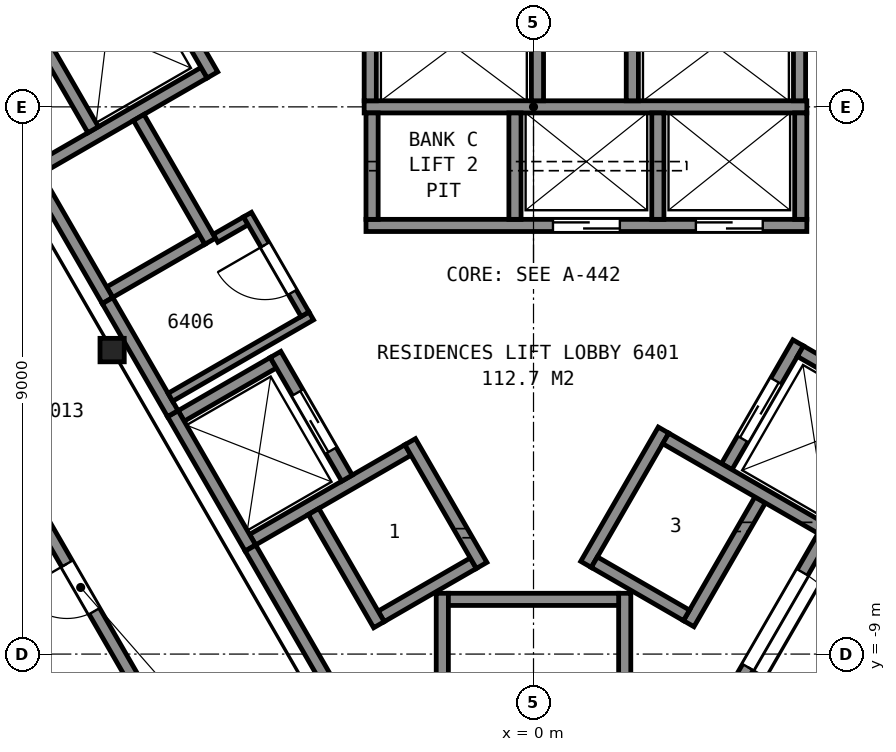
"""IFC4 building model, lengths in metres.
Left out: names, types, materials, properties, quantities, classifications, styles, units other than length and angle.
Written with IfcOpenShell. Run it as: python <this file> out.ifc"""

import sys

from ifc_helpers import new_model, si_unit, direction, frame, frame_2d, origin, origin_2d, place, context, subcontext, project, spatial, rectangle, i_section, extrude, element, fill, save


model = new_model("IFC4")
c1 = context("Model", 3, precision=1e-05, world=origin(), true_north=direction((0.0, 1.0)))
c2 = subcontext(c1, "Body", "Model", "MODEL_VIEW")
j1 = project(units=[si_unit("LENGTHUNIT", "METRE"), si_unit("PLANEANGLEUNIT", "RADIAN")], contexts=[c1])
p1 = place(None, origin())
s1 = spatial("IfcSite", under=j1, at=p1, CompositionType="ELEMENT")
p2 = place(p1, origin())
s2 = spatial("IfcBuilding", under=s1, at=p2, CompositionType="ELEMENT")
p3 = place(p2, frame((0.0, 0.0, 254.5)))
s3 = spatial("IfcBuildingStorey", under=s2, at=p3, CompositionType="ELEMENT", Elevation=254.5)
p4 = place(p3, frame((-6.93, -4.0, 0.0), z_axis=(0.0, 0.0, 1.0), x_axis=(1.0, 0.0, 0.0)))
e1 = element("IfcColumn", 1, at=p4, inside=s3, PredefinedType="COLUMN", context=c2, shape_type="SweptSolid", body=[
    extrude(i_section(OverallWidth=0.399, OverallDepth=0.386, WebThickness=0.021, FlangeThickness=0.033, FilletRadius=0.015, at=origin_2d()), origin(), (0.0, 0.0, 1.0), 3.66),
])
for number, where, z_axis, x_axis in (
    (2, (1.5, -8.0, 0.0), (0.0, 0.0, 1.0), (0.0, -1.0, 0.0)),
    (3, (-1.5, -8.0, 0.0), (0.0, 0.0, 1.0), (0.0, -1.0, 0.0)),
):
    element("IfcWall", number, at=place(p3, frame(where, z_axis=z_axis, x_axis=x_axis)), inside=s3, PredefinedType="PARTITIONING", context=c2, shape_type="SweptSolid", body=[
        extrude(rectangle(XDim=9.6, YDim=0.2, at=frame_2d((4.8, 0.0))), origin(), (0.0, 0.0, 1.0), 3.45),
    ])
p5 = place(p3, frame((-1.4, -8.1, 0.0), z_axis=(0.0, 0.0, 1.0), x_axis=(1.0, 0.0, 0.0)))
e4 = element("IfcWall", 4, at=p5, inside=s3, PredefinedType="PARTITIONING", context=c2, shape_type="SweptSolid", body=[
    extrude(rectangle(XDim=2.8, YDim=0.2, at=frame_2d((1.4, 0.0))), origin(), (0.0, 0.0, 1.0), 3.45),
])
p6 = place(p3, frame((-2.755, -1.95, 0.0), z_axis=(0.0, 0.0, 1.0), x_axis=(1.0, 0.0, 0.0)))
e5 = element("IfcWall", 5, at=p6, inside=s3, PredefinedType="PARTITIONING", context=c2, shape_type="SweptSolid", body=[
    extrude(rectangle(XDim=7.25, YDim=0.2, at=frame_2d((3.625, 0.0))), origin(), (0.0, 0.0, 1.0), 3.7),
])
p7 = place(p6, frame((3.075, 0.0, 0.0)))
e6 = element("IfcOpeningElement", 6, at=p7, cuts=e5, PredefinedType="OPENING", context=c2, shape_type="SweptSolid", body=[
    extrude(rectangle(XDim=1.1, YDim=2.1, at=frame_2d((0.55, 1.05))), frame((0.0, 0.11, 0.0), z_axis=(0.0, -1.0, 0.0), x_axis=(1.0, 0.0, 0.0)), (0.0, 0.0, 1.0), 0.22),
])
p8 = place(p6, frame((5.425, 0.0, 0.0)))
e7 = element("IfcOpeningElement", 7, at=p8, cuts=e5, PredefinedType="OPENING", context=c2, shape_type="SweptSolid", body=[
    extrude(rectangle(XDim=1.1, YDim=2.1, at=frame_2d((0.55, 1.05))), frame((0.0, 0.11, 0.0), z_axis=(0.0, -1.0, 0.0), x_axis=(1.0, 0.0, 0.0)), (0.0, 0.0, 1.0), 0.22),
])
p9 = place(p3, frame((-2.785, 0.0, 0.0), z_axis=(0.0, 0.0, 1.0), x_axis=(1.0, 0.0, 0.0)))
e8 = element("IfcWall", 8, at=p9, inside=s3, PredefinedType="PARTITIONING", context=c2, shape_type="SweptSolid", body=[
    extrude(rectangle(XDim=7.28, YDim=0.2, at=frame_2d((3.64, 0.0))), origin(), (0.0, 0.0, 1.0), 3.7),
])
p10 = place(p3, frame((-2.505, -8.38, 0.0), z_axis=(0.0, 0.0, 1.0), x_axis=(0.866002029911, 0.500040482552, 0.0)))
e9 = element("IfcWall", 9, at=p10, inside=s3, PredefinedType="PARTITIONING", context=c2, shape_type="SweptSolid", body=[
    extrude(rectangle(XDim=1.75, YDim=0.2, at=frame_2d((0.875, 0.0))), origin(), (0.0, 0.0, 1.0), 3.7),
])
p11 = place(p3, frame((-4.62, -7.118, 0.0), z_axis=(0.0, 0.0, 1.0), x_axis=(0.866039495442, 0.49997559174, 0.0)))
e10 = element("IfcWall", 10, at=p11, inside=s3, PredefinedType="PARTITIONING", context=c2, shape_type="SweptSolid", body=[
    extrude(rectangle(XDim=2.95, YDim=0.2, at=frame_2d((1.475, 0.0))), origin(), (0.0, 0.0, 1.0), 3.7),
])
for number, where, z_axis, x_axis in (
    (11, (-5.795, -5.083, 0.0), (0.0, 0.0, 1.0), (0.866, 0.5, 0.0)),
    (12, (-6.97, -3.048, 0.0), (0.0, 0.0, 1.0), (0.866, 0.5, 0.0)),
):
    element("IfcWall", number, at=place(p3, frame(where, z_axis=z_axis, x_axis=x_axis)), inside=s3, PredefinedType="PARTITIONING", context=c2, shape_type="SweptSolid", body=[
        extrude(rectangle(XDim=1.75, YDim=0.2, at=frame_2d((0.875, 0.0))), origin(), (0.0, 0.0, 1.0), 3.7),
    ])
p12 = place(p3, frame((-8.145, -1.013, 0.0), z_axis=(0.0, 0.0, 1.0), x_axis=(0.866016494683, 0.500015430699, 0.0)))
e13 = element("IfcWall", 13, at=p12, inside=s3, PredefinedType="PARTITIONING", context=c2, shape_type="SweptSolid", body=[
    extrude(rectangle(XDim=3.15, YDim=0.2, at=frame_2d((1.575, 0.0))), origin(), (0.0, 0.0, 1.0), 3.7),
])
p13 = place(p3, frame((2.552, -8.5, 0.0), z_axis=(0.0, 0.0, 1.0), x_axis=(0.500016218704, 0.866016039709, 0.0)))
e14 = element("IfcWall", 14, at=p13, inside=s3, PredefinedType="PARTITIONING", context=c2, shape_type="SweptSolid", body=[
    extrude(rectangle(XDim=2.35, YDim=0.2, at=frame_2d((1.175, 0.0))), origin(), (0.0, 0.0, 1.0), 3.7),
])
p14 = place(p3, frame((3.177, -5.917, 0.0), z_axis=(0.0, 0.0, 1.0), x_axis=(0.500016218704, 0.866016039709, 0.0)))
e15 = element("IfcWall", 15, at=p14, inside=s3, PredefinedType="PARTITIONING", context=c2, shape_type="SweptSolid", body=[
    extrude(rectangle(XDim=2.35, YDim=0.2, at=frame_2d((1.175, 0.0))), origin(), (0.0, 0.0, 1.0), 3.7),
])
p15 = place(p14, frame((0.525, 0.0, 0.0)))
e16 = element("IfcOpeningElement", 16, at=p15, cuts=e15, PredefinedType="OPENING", context=c2, shape_type="SweptSolid", body=[
    extrude(rectangle(XDim=1.1, YDim=2.1, at=frame_2d((0.55, 1.05))), frame((0.0, 0.11, 0.0), z_axis=(0.0, -1.0, 0.0), x_axis=(1.0, 0.0, 0.0)), (0.0, 0.0, 1.0), 0.22),
])
p16 = place(p3, frame((0.863, -7.525, 0.0), z_axis=(0.0, 0.0, 1.0), x_axis=(0.499990435942, 0.866030925526, 0.0)))
e17 = element("IfcWall", 17, at=p16, inside=s3, PredefinedType="PARTITIONING", context=c2, shape_type="SweptSolid", body=[
    extrude(rectangle(XDim=2.55, YDim=0.2, at=frame_2d((1.275, 0.0))), origin(), (0.0, 0.0, 1.0), 3.7),
])
p17 = place(p3, frame((4.395, -1.85, 0.0), z_axis=(0.0, 0.0, 1.0), x_axis=(0.0, 1.0, 0.0)))
e18 = element("IfcWall", 18, at=p17, inside=s3, PredefinedType="PARTITIONING", context=c2, shape_type="SweptSolid", body=[
    extrude(rectangle(XDim=1.75, YDim=0.2, at=frame_2d((0.875, 0.0))), origin(), (0.0, 0.0, 1.0), 3.7),
])
p18 = place(p3, frame((4.375, 0.1, 0.0), z_axis=(0.0, 0.0, 1.0), x_axis=(0.0, 1.0, 0.0)))
e19 = element("IfcWall", 19, at=p18, inside=s3, PredefinedType="PARTITIONING", context=c2, shape_type="SweptSolid", body=[
    extrude(rectangle(XDim=1.95, YDim=0.2, at=frame_2d((0.975, 0.0))), origin(), (0.0, 0.0, 1.0), 3.7),
])
p19 = place(p3, frame((2.045, -1.85, 0.0), z_axis=(0.0, 0.0, 1.0), x_axis=(0.0, 1.0, 0.0)))
e20 = element("IfcWall", 20, at=p19, inside=s3, PredefinedType="PARTITIONING", context=c2, shape_type="SweptSolid", body=[
    extrude(rectangle(XDim=1.75, YDim=0.2, at=frame_2d((0.875, 0.0))), origin(), (0.0, 0.0, 1.0), 3.7),
])
for number, where, z_axis, x_axis in (
    (21, (1.625, 0.1, 0.0), (0.0, 0.0, 1.0), (0.0, 1.0, 0.0)),
    (22, (0.065, 0.1, 0.0), (0.0, 0.0, 1.0), (0.0, 1.0, 0.0)),
):
    element("IfcWall", number, at=place(p3, frame(where, z_axis=z_axis, x_axis=x_axis)), inside=s3, PredefinedType="PARTITIONING", context=c2, shape_type="SweptSolid", body=[
        extrude(rectangle(XDim=1.95, YDim=0.2, at=frame_2d((0.975, 0.0))), origin(), (0.0, 0.0, 1.0), 3.7),
    ])
for number, where, z_axis, x_axis in (
    (23, (-0.305, -1.85, 0.0), (0.0, 0.0, 1.0), (0.0, 1.0, 0.0)),
    (24, (-2.655, -1.85, 0.0), (0.0, 0.0, 1.0), (0.0, 1.0, 0.0)),
):
    element("IfcWall", number, at=place(p3, frame(where, z_axis=z_axis, x_axis=x_axis)), inside=s3, PredefinedType="PARTITIONING", context=c2, shape_type="SweptSolid", body=[
        extrude(rectangle(XDim=1.75, YDim=0.2, at=frame_2d((0.875, 0.0))), origin(), (0.0, 0.0, 1.0), 3.7),
    ])
p20 = place(p3, frame((-2.685, 0.1, 0.0), z_axis=(0.0, 0.0, 1.0), x_axis=(0.0, 1.0, 0.0)))
e25 = element("IfcWall", 25, at=p20, inside=s3, PredefinedType="PARTITIONING", context=c2, shape_type="SweptSolid", body=[
    extrude(rectangle(XDim=1.95, YDim=0.2, at=frame_2d((0.975, 0.0))), origin(), (0.0, 0.0, 1.0), 3.7),
])
p21 = place(p3, frame((-5.28, 0.525, 0.0), z_axis=(0.0, 0.0, 1.0), x_axis=(-0.500037662692, 0.866003658127, 0.0)))
e26 = element("IfcWall", 26, at=p21, inside=s3, PredefinedType="PARTITIONING", context=c2, shape_type="SweptSolid", body=[
    extrude(rectangle(XDim=2.95, YDim=0.2, at=frame_2d((1.475, 0.0))), origin(), (0.0, 0.0, 1.0), 3.7),
])
p22 = place(p21, frame((0.925, 0.0, 0.0)))
e27 = element("IfcOpeningElement", 27, at=p22, cuts=e26, PredefinedType="OPENING", context=c2, shape_type="SweptSolid", body=[
    extrude(rectangle(XDim=1.1, YDim=2.1, at=frame_2d((0.55, 1.05))), frame((0.0, 0.11, 0.0), z_axis=(0.0, -1.0, 0.0), x_axis=(1.0, 0.0, 0.0)), (0.0, 0.0, 1.0), 0.22),
])
p23 = place(p3, frame((-0.853, -7.542, 0.0), z_axis=(0.0, 0.0, 1.0), x_axis=(-0.500016218704, 0.866016039709, 0.0)))
e28 = element("IfcWall", 28, at=p23, inside=s3, PredefinedType="PARTITIONING", context=c2, shape_type="SweptSolid", body=[
    extrude(rectangle(XDim=2.35, YDim=0.2, at=frame_2d((1.175, 0.0))), origin(), (0.0, 0.0, 1.0), 3.7),
])
p24 = place(p3, frame((-3.068, -6.107, 0.0), z_axis=(0.0, 0.0, 1.0), x_axis=(-0.499938297808, 0.866061024631, 0.0)))
e29 = element("IfcWall", 29, at=p24, inside=s3, PredefinedType="PARTITIONING", context=c2, shape_type="SweptSolid", body=[
    extrude(rectangle(XDim=2.35, YDim=0.2, at=frame_2d((1.175, 0.0))), origin(), (0.0, 0.0, 1.0), 3.7),
])
p25 = place(p24, frame((0.525, 0.0, 0.0)))
e30 = element("IfcOpeningElement", 30, at=p25, cuts=e29, PredefinedType="OPENING", context=c2, shape_type="SweptSolid", body=[
    extrude(rectangle(XDim=1.1, YDim=2.1, at=frame_2d((0.55, 1.05))), frame((0.0, 0.11, 0.0), z_axis=(0.0, -1.0, 0.0), x_axis=(1.0, 0.0, 0.0)), (0.0, 0.0, 1.0), 0.22),
])
p26 = place(p3, frame((-5.318, -2.21, 0.0), z_axis=(0.0, 0.0, 1.0), x_axis=(-0.499938297808, 0.866061024631, 0.0)))
e31 = element("IfcWall", 31, at=p26, inside=s3, PredefinedType="PARTITIONING", context=c2, shape_type="SweptSolid", body=[
    extrude(rectangle(XDim=2.35, YDim=0.2, at=frame_2d((1.175, 0.0))), origin(), (0.0, 0.0, 1.0), 3.7),
])
p27 = place(p3, frame((-2.542, -8.517, 0.0), z_axis=(0.0, 0.0, 1.0), x_axis=(-0.499961633463, 0.866047553582, 0.0)))
e32 = element("IfcWall", 32, at=p27, inside=s3, PredefinedType="PARTITIONING", context=c2, shape_type="SweptSolid", body=[
    extrude(rectangle(XDim=2.15, YDim=0.2, at=frame_2d((1.075, 0.0))), origin(), (0.0, 0.0, 1.0), 3.7),
])
p28 = place(p3, frame((-7.242, -0.376, 0.0), z_axis=(0.0, 0.0, 1.0), x_axis=(-0.499996545922, 0.866027397988, 0.0)))
e33 = element("IfcWall", 33, at=p28, inside=s3, PredefinedType="PARTITIONING", context=c2, shape_type="SweptSolid", body=[
    extrude(rectangle(XDim=2.75, YDim=0.2, at=frame_2d((1.375, 0.0))), origin(), (0.0, 0.0, 1.0), 3.7),
])
for number, where, z_axis, x_axis in (
    (34, (-4.656, -7.255, 0.0), (0.0, 0.0, 1.0), (-0.5, 0.866, 0.0)),
    (35, (-7.006, -3.185, 0.0), (0.0, 0.0, 1.0), (-0.5, 0.866, 0.0)),
):
    element("IfcWall", number, at=place(p3, frame(where, z_axis=z_axis, x_axis=x_axis)), inside=s3, PredefinedType="PARTITIONING", context=c2, shape_type="SweptSolid", body=[
        extrude(rectangle(XDim=2.55, YDim=0.2, at=frame_2d((1.275, 0.0))), origin(), (0.0, 0.0, 1.0), 3.7),
    ])
p29 = place(p3, frame((5.905, -4.893, 0.0), z_axis=(0.0, 0.0, 1.0), x_axis=(-0.866002029911, 0.500040482552, 0.0)))
e36 = element("IfcWall", 36, at=p29, inside=s3, PredefinedType="PARTITIONING", context=c2, shape_type="SweptSolid", body=[
    extrude(rectangle(XDim=1.75, YDim=0.2, at=frame_2d((0.875, 0.0))), origin(), (0.0, 0.0, 1.0), 3.7),
])
p30 = place(p3, frame((4.73, -6.928, 0.0), z_axis=(0.0, 0.0, 1.0), x_axis=(-0.866024349092, 0.500001826776, 0.0)))
e37 = element("IfcWall", 37, at=p30, inside=s3, PredefinedType="PARTITIONING", context=c2, shape_type="SweptSolid", body=[
    extrude(rectangle(XDim=2.95, YDim=0.2, at=frame_2d((1.475, 0.0))), origin(), (0.0, 0.0, 1.0), 3.7),
])
p31 = place(p3, frame((2.515, -8.363, 0.0), z_axis=(0.0, 0.0, 1.0), x_axis=(-0.866036909293, 0.499980071345, 0.0)))
e38 = element("IfcWall", 38, at=p31, inside=s3, PredefinedType="PARTITIONING", context=c2, shape_type="SweptSolid", body=[
    extrude(rectangle(XDim=1.75, YDim=0.2, at=frame_2d((0.875, 0.0))), origin(), (0.0, 0.0, 1.0), 3.7),
])
p32 = place(p3, frame((-7.005, -3.187, 0.0), z_axis=(0.0, 0.0, 1.0), x_axis=(0.499689606989, -0.866204535123, 0.0)))
e39 = element("IfcWall", 39, at=p32, inside=s3, PredefinedType="PARTITIONING", context=c2, shape_type="SweptSolid", body=[
    extrude(rectangle(XDim=2.145, YDim=0.2, at=frame_2d((1.072, 0.0))), origin(), (0.0, 0.0, 1.0), 3.45),
])
p33 = place(p3, frame((-5.972, -4.776, 0.0), z_axis=(0.0, 0.0, 1.0), x_axis=(0.8660731567, 0.4999172804, 0.0)))
e40 = element("IfcWall", 40, at=p33, inside=s3, PredefinedType="PARTITIONING", context=c2, shape_type="SweptSolid", body=[
    extrude(rectangle(XDim=2.676, YDim=0.15, at=frame_2d((1.338, 0.0))), origin(), (0.0, 0.0, 1.0), 3.45),
])
p34 = place(p3, frame((-5.229, -2.161, 0.0), z_axis=(0.0, 0.0, 1.0), x_axis=(0.866906303058, 0.498471124258, 0.0)))
e41 = element("IfcWall", 41, at=p34, inside=s3, PredefinedType="PARTITIONING", context=c2, shape_type="SweptSolid", body=[
    extrude(rectangle(XDim=0.574, YDim=0.15, at=frame_2d((0.287, 0.0))), origin(), (0.0, 0.0, 1.0), 3.45),
])
p35 = place(p3, frame((-3.758, -3.411, 0.0), z_axis=(0.0, 0.0, 1.0), x_axis=(-0.499871346238, 0.866099669328, 0.0)))
e42 = element("IfcWall", 42, at=p35, inside=s3, PredefinedType="PARTITIONING", context=c2, shape_type="SweptSolid", body=[
    extrude(rectangle(XDim=1.893, YDim=0.15, at=frame_2d((0.946, 0.0))), origin(), (0.0, 0.0, 1.0), 3.45),
])
p36 = place(p35, frame((0.417, 0.0, 0.0)))
e43 = element("IfcOpeningElement", 43, at=p36, cuts=e42, PredefinedType="OPENING", context=c2, shape_type="SweptSolid", body=[
    extrude(rectangle(XDim=0.9, YDim=2.1, at=frame_2d((0.45, 1.05))), frame((0.0, 0.085, 0.0), z_axis=(0.0, -1.0, 0.0), x_axis=(1.0, 0.0, 0.0)), (0.0, 0.0, 1.0), 0.17),
])
p37 = place(p3, frame((-4.655, -7.257, 0.0), z_axis=(0.0, 0.0, 1.0), x_axis=(0.499966124405, -0.866044960985, 0.0)))
e44 = element("IfcWall", 44, at=p37, inside=s3, PredefinedType="PARTITIONING", context=c2, shape_type="SweptSolid", body=[
    extrude(rectangle(XDim=5.956, YDim=0.2, at=frame_2d((2.978, 0.0))), origin(), (0.0, 0.0, 1.0), 3.45),
])
p38 = place(p3, frame((1.677, -12.415, 0.0), z_axis=(0.0, 0.0, 1.0), x_axis=(0.500054337157, 0.865994029939, 0.0)))
e45 = element("IfcWall", 45, at=p38, inside=s3, PredefinedType="PARTITIONING", context=c2, shape_type="SweptSolid", body=[
    extrude(rectangle(XDim=6.177, YDim=0.2, at=frame_2d((3.088, 0.0))), origin(), (0.0, 0.0, 1.0), 3.45),
])
p39 = place(p38, frame((3.695, 0.0, 0.0)))
e46 = element("IfcOpeningElement", 46, at=p39, cuts=e45, PredefinedType="OPENING", context=c2, shape_type="SweptSolid", body=[
    extrude(rectangle(XDim=1.8, YDim=2.1, at=frame_2d((0.9, 1.05))), frame((0.0, 0.11, 0.0), z_axis=(0.0, -1.0, 0.0), x_axis=(1.0, 0.0, 0.0)), (0.0, 0.0, 1.0), 0.22),
])
p40 = place(p3, frame((-4.675, -12.706, 0.0), z_axis=(0.0, 0.0, 1.0), x_axis=(-0.499972470324, 0.866041297467, 0.0)))
e47 = element("IfcWall", 47, at=p40, inside=s3, PredefinedType="PARTITIONING", context=c2, shape_type="SweptSolid", body=[
    extrude(rectangle(XDim=17.385, YDim=0.2, at=frame_2d((8.692, 0.0))), origin(), (0.0, 0.0, 1.0), 2.362),
])
p41 = place(p40, frame((14.57, 0.0, 0.0)))
e48 = element("IfcOpeningElement", 48, at=p41, cuts=e47, PredefinedType="OPENING", context=c2, shape_type="SweptSolid", body=[
    extrude(rectangle(XDim=0.9, YDim=2.1, at=frame_2d((0.45, 1.05))), frame((0.0, 0.11, 0.0), z_axis=(0.0, -1.0, 0.0), x_axis=(1.0, 0.0, 0.0)), (0.0, 0.0, 1.0), 0.22),
])
p42 = place(p40, frame((11.777, 0.0, 0.0)))
e49 = element("IfcOpeningElement", 49, at=p42, cuts=e47, PredefinedType="OPENING", context=c2, shape_type="SweptSolid", body=[
    extrude(rectangle(XDim=0.9, YDim=2.1, at=frame_2d((0.45, 1.05))), frame((0.0, 0.11, 0.0), z_axis=(0.0, -1.0, 0.0), x_axis=(1.0, 0.0, 0.0)), (0.0, 0.0, 1.0), 0.22),
])
p43 = place(p40, frame((5.095, 0.0, 0.0)))
e50 = element("IfcOpeningElement", 50, at=p43, cuts=e47, PredefinedType="OPENING", context=c2, shape_type="SweptSolid", body=[
    extrude(rectangle(XDim=0.9, YDim=2.1, at=frame_2d((0.45, 1.05))), frame((0.0, 0.11, 0.0), z_axis=(0.0, -1.0, 0.0), x_axis=(1.0, 0.0, 0.0)), (0.0, 0.0, 1.0), 0.22),
])
p44 = place(p3, frame((13.342, 2.306, 0.0), z_axis=(0.0, 0.0, 1.0), x_axis=(-0.499983003136, -0.866035216706, 0.0)))
e51 = element("IfcWall", 51, at=p44, inside=s3, PredefinedType="PARTITIONING", context=c2, shape_type="SweptSolid", body=[
    extrude(rectangle(XDim=17.385, YDim=0.2, at=frame_2d((8.692, 0.0))), origin(), (0.0, 0.0, 1.0), 2.362),
])
p45 = place(p44, frame((15.185, 0.0, 0.0)))
e52 = element("IfcOpeningElement", 52, at=p45, cuts=e51, PredefinedType="OPENING", context=c2, shape_type="SweptSolid", body=[
    extrude(rectangle(XDim=0.9, YDim=2.1, at=frame_2d((0.45, 1.05))), frame((0.0, 0.11, 0.0), z_axis=(0.0, -1.0, 0.0), x_axis=(1.0, 0.0, 0.0)), (0.0, 0.0, 1.0), 0.22),
])
p46 = place(p44, frame((12.094, 0.0, 0.0)))
e53 = element("IfcOpeningElement", 53, at=p46, cuts=e51, PredefinedType="OPENING", context=c2, shape_type="SweptSolid", body=[
    extrude(rectangle(XDim=0.9, YDim=2.1, at=frame_2d((0.45, 1.05))), frame((0.0, 0.11, 0.0), z_axis=(0.0, -1.0, 0.0), x_axis=(1.0, 0.0, 0.0)), (0.0, 0.0, 1.0), 0.22),
])
p47 = place(p44, frame((5.867, 0.0, 0.0)))
e54 = element("IfcOpeningElement", 54, at=p47, cuts=e51, PredefinedType="OPENING", context=c2, shape_type="SweptSolid", body=[
    extrude(rectangle(XDim=0.9, YDim=2.1, at=frame_2d((0.45, 1.05))), frame((0.0, 0.11, 0.0), z_axis=(0.0, -1.0, 0.0), x_axis=(1.0, 0.0, 0.0)), (0.0, 0.0, 1.0), 0.22),
])
p48 = place(p44, frame((1.392, 0.0, 0.0)))
e55 = element("IfcOpeningElement", 55, at=p48, cuts=e51, PredefinedType="OPENING", context=c2, shape_type="SweptSolid", body=[
    extrude(rectangle(XDim=0.9, YDim=2.1, at=frame_2d((0.45, 1.05))), frame((0.0, 0.11, 0.0), z_axis=(0.0, -1.0, 0.0), x_axis=(1.0, 0.0, 0.0)), (0.0, 0.0, 1.0), 0.22),
])
p49 = place(p7, origin())
e56 = element("IfcDoor", 56, at=p49, inside=s3, OperationType="SLIDING_TO_LEFT", PredefinedType="DOOR", context=c2, shape_type="SweptSolid", body=[
    extrude(rectangle(XDim=1.1, YDim=2.1, at=frame_2d((0.55, 1.05))), frame((0.0, 0.025, 0.0), z_axis=(0.0, -1.0, 0.0), x_axis=(1.0, 0.0, 0.0)), (0.0, 0.0, 1.0), 0.05),
])
fill(e6, e56)
p50 = place(p8, origin())
e57 = element("IfcDoor", 57, at=p50, inside=s3, OperationType="SLIDING_TO_RIGHT", PredefinedType="DOOR", context=c2, shape_type="SweptSolid", body=[
    extrude(rectangle(XDim=1.1, YDim=2.1, at=frame_2d((0.55, 1.05))), frame((0.0, 0.025, 0.0), z_axis=(0.0, -1.0, 0.0), x_axis=(1.0, 0.0, 0.0)), (0.0, 0.0, 1.0), 0.05),
])
fill(e7, e57)
p51 = place(p15, origin())
e58 = element("IfcDoor", 58, at=p51, inside=s3, OperationType="SLIDING_TO_LEFT", PredefinedType="DOOR", context=c2, shape_type="SweptSolid", body=[
    extrude(rectangle(XDim=1.1, YDim=2.1, at=frame_2d((0.55, 1.05))), frame((0.0, 0.025, 0.0), z_axis=(0.0, -1.0, 0.0), x_axis=(1.0, 0.0, 0.0)), (0.0, 0.0, 1.0), 0.05),
])
fill(e16, e58)
p52 = place(p25, origin())
e59 = element("IfcDoor", 59, at=p52, inside=s3, OperationType="SLIDING_TO_RIGHT", PredefinedType="DOOR", context=c2, shape_type="SweptSolid", body=[
    extrude(rectangle(XDim=1.1, YDim=2.1, at=frame_2d((0.55, 1.05))), frame((0.0, 0.025, 0.0), z_axis=(0.0, -1.0, 0.0), x_axis=(1.0, 0.0, 0.0)), (0.0, 0.0, 1.0), 0.05),
])
fill(e30, e59)
p53 = place(p36, origin())
e60 = element("IfcDoor", 60, at=p53, inside=s3, OperationType="SINGLE_SWING_RIGHT", PredefinedType="DOOR", context=c2, shape_type="SweptSolid", body=[
    extrude(rectangle(XDim=0.9, YDim=2.1, at=frame_2d((0.45, 1.05))), frame((0.0, 0.025, 0.0), z_axis=(0.0, -1.0, 0.0), x_axis=(1.0, 0.0, 0.0)), (0.0, 0.0, 1.0), 0.05),
])
fill(e43, e60)
p54 = place(p39, origin())
e61 = element("IfcDoor", 61, at=p54, inside=s3, OperationType="DOUBLE_DOOR_SINGLE_SWING", PredefinedType="DOOR", context=c2, shape_type="SweptSolid", body=[
    extrude(rectangle(XDim=1.8, YDim=2.1, at=frame_2d((0.9, 1.05))), frame((0.0, 0.025, 0.0), z_axis=(0.0, -1.0, 0.0), x_axis=(1.0, 0.0, 0.0)), (0.0, 0.0, 1.0), 0.05),
])
fill(e46, e61)
p55 = place(p43, origin())
e62 = element("IfcDoor", 62, at=p55, inside=s3, OperationType="SINGLE_SWING_RIGHT", PredefinedType="DOOR", context=c2, shape_type="SweptSolid", body=[
    extrude(rectangle(XDim=0.9, YDim=2.1, at=frame_2d((0.45, 1.05))), frame((0.0, 0.025, 0.0), z_axis=(0.0, -1.0, 0.0), x_axis=(1.0, 0.0, 0.0)), (0.0, 0.0, 1.0), 0.05),
])
fill(e50, e62)
save(model, sys.argv[1])
